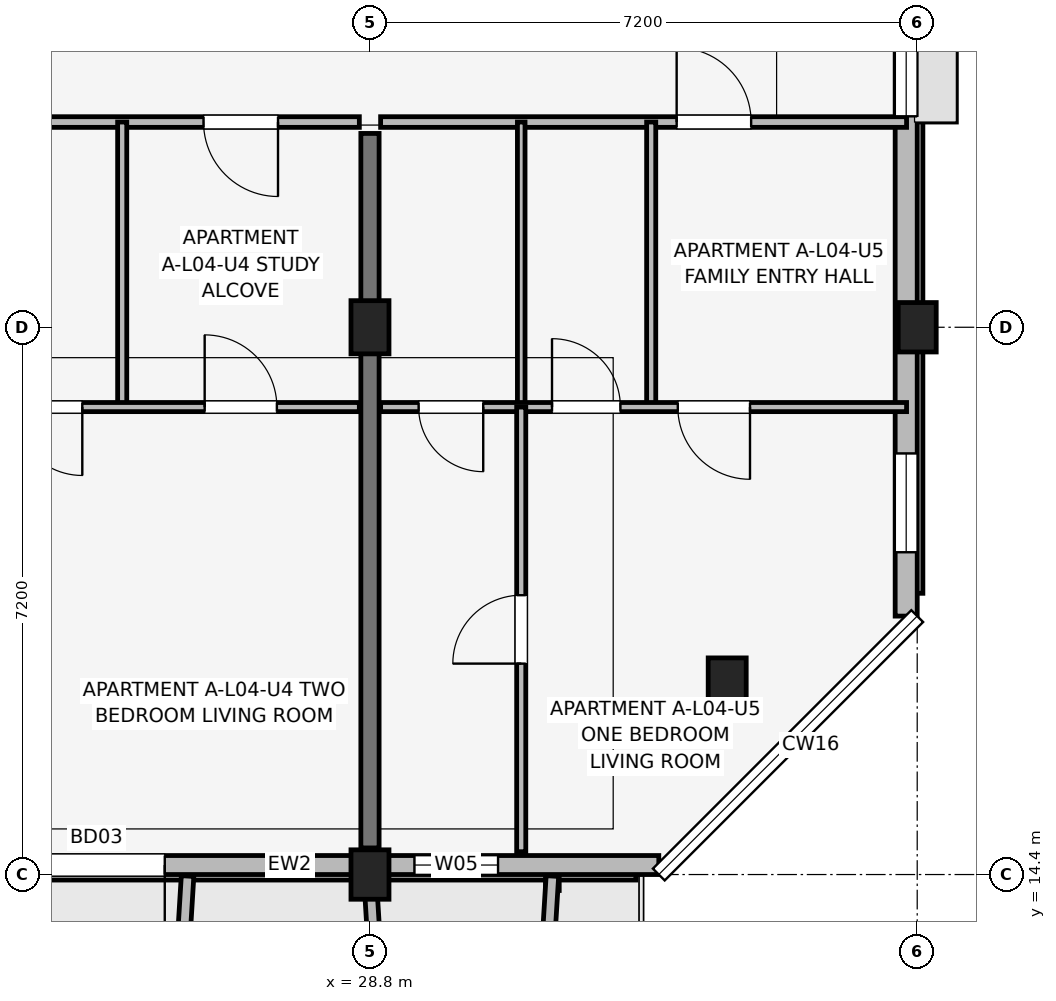
"""IFC4 building model, lengths in metres.
Left out: names, types, materials, properties, quantities, classifications, styles, units other than length and angle.
Written with IfcOpenShell. Run it as: python <this file> out.ifc"""

import sys

from ifc_helpers import new_model, si_unit, direction, frame, frame_2d, origin, origin_2d, place, context, subcontext, project, spatial, rectangle, extrude, element, fill, save


model = new_model("IFC4")
c1 = context("Model", 3, precision=1e-05, world=origin(), true_north=direction((0.0, 1.0)))
c2 = subcontext(c1, "Body", "Model", "MODEL_VIEW")
j1 = project(units=[si_unit("LENGTHUNIT", "METRE"), si_unit("PLANEANGLEUNIT", "RADIAN")], contexts=[c1])
p1 = place(None, origin())
s1 = spatial("IfcSite", under=j1, at=p1, CompositionType="ELEMENT")
p2 = place(p1, origin())
s2 = spatial("IfcBuilding", under=s1, at=p2, CompositionType="ELEMENT")
p3 = place(p2, frame((0.0, 0.0, 15.0)))
s3 = spatial("IfcBuildingStorey", under=s2, at=p3, CompositionType="ELEMENT", Elevation=15.0)
p4 = place(p3, frame((28.8, 14.4, 0.0), z_axis=(0.0, 0.0, 1.0), x_axis=(1.0, 0.0, 0.0)))
e1 = element("IfcColumn", 1, at=p4, inside=s3, PredefinedType="COLUMN", context=c2, shape_type="SweptSolid", body=[
    extrude(rectangle(XDim=0.5, YDim=0.65, at=origin_2d()), origin(), (0.0, 0.0, 1.0), 3.15),
])
for number, where, z_axis, x_axis in (
    (2, (28.8, 21.6, 0.0), (0.0, 0.0, 1.0), (1.0, 0.0, 0.0)),
    (3, (33.5, 16.9, 0.0), (0.0, 0.0, 1.0), (1.0, 0.0, 0.0)),
):
    element("IfcColumn", number, at=place(p3, frame(where, z_axis=z_axis, x_axis=x_axis)), inside=s3, PredefinedType="COLUMN", context=c2, shape_type="SweptSolid", body=[
        extrude(rectangle(XDim=0.5, YDim=0.7, at=origin_2d()), origin(), (0.0, 0.0, 1.0), 3.15),
    ])
p5 = place(p3, frame((36.0, 21.6, 0.0), z_axis=(0.0, 0.0, 1.0), x_axis=(1.0, 0.0, 0.0)))
e4 = element("IfcColumn", 4, at=p5, inside=s3, PredefinedType="COLUMN", context=c2, shape_type="SweptSolid", body=[
    extrude(rectangle(XDim=0.5, YDim=0.65, at=origin_2d()), origin(), (0.0, 0.0, 1.0), 3.15),
])
p6 = place(p3, frame((28.8, 14.75, 0.0), z_axis=(0.0, 0.0, 1.0), x_axis=(0.0, 1.0, 0.0)))
e5 = element("IfcWall", 5, at=p6, inside=s3, PredefinedType="SHEAR", context=c2, shape_type="SweptSolid", body=[
    extrude(rectangle(XDim=9.4, YDim=0.24, at=frame_2d((4.7, 0.0))), origin(), (0.0, 0.0, 1.0), 3.15),
])
p7 = place(p3, frame((3.4, 14.525, 0.0), z_axis=(0.0, 0.0, 1.0), x_axis=(1.0, 0.0, 0.0)))
e6 = element("IfcWall", 6, at=p7, inside=s3, PredefinedType="SOLIDWALL", context=c2, shape_type="SweptSolid", body=[
    extrude(rectangle(XDim=29.2, YDim=0.25, at=frame_2d((14.6, 0.0))), origin(), (0.0, 0.0, 1.0), 2.43),
])
p8 = place(p7, frame((8.15, 0.0, 0.0), z_axis=(0.0, 0.0, 1.0), x_axis=(-1.0, 0.0, 0.0)))
e7 = element("IfcOpeningElement", 7, at=p8, cuts=e6, PredefinedType="OPENING", context=c2, shape_type="SweptSolid", body=[
    extrude(rectangle(XDim=1.5, YDim=2.15, at=frame_2d((0.75, 1.075))), frame((0.0, 0.135, 0.0), z_axis=(0.0, -1.0, 0.0), x_axis=(1.0, 0.0, 0.0)), (0.0, 0.0, 1.0), 0.27),
])
p9 = place(p7, frame((22.7, 0.0, 0.0), z_axis=(0.0, 0.0, 1.0), x_axis=(-1.0, 0.0, 0.0)))
e8 = element("IfcOpeningElement", 8, at=p9, cuts=e6, PredefinedType="OPENING", context=c2, shape_type="SweptSolid", body=[
    extrude(rectangle(XDim=1.8, YDim=2.15, at=frame_2d((0.9, 1.075))), frame((0.0, 0.135, 0.0), z_axis=(0.0, -1.0, 0.0), x_axis=(1.0, 0.0, 0.0)), (0.0, 0.0, 1.0), 0.27),
])
p10 = place(p7, frame((2.155, 0.0, 0.75)))
e9 = element("IfcOpeningElement", 9, at=p10, cuts=e6, PredefinedType="OPENING", context=c2, shape_type="SweptSolid", body=[
    extrude(rectangle(XDim=1.22, YDim=1.5, at=frame_2d((0.61, 0.75))), frame((0.0, 0.135, 0.0), z_axis=(0.0, -1.0, 0.0), x_axis=(1.0, 0.0, 0.0)), (0.0, 0.0, 1.0), 0.27),
])
p11 = place(p7, frame((4.635, 0.0, 0.75)))
e10 = element("IfcOpeningElement", 10, at=p11, cuts=e6, PredefinedType="OPENING", context=c2, shape_type="SweptSolid", body=[
    extrude(rectangle(XDim=0.6, YDim=1.25, at=frame_2d((0.3, 0.625))), frame((0.0, 0.135, 0.0), z_axis=(0.0, -1.0, 0.0), x_axis=(1.0, 0.0, 0.0)), (0.0, 0.0, 1.0), 0.27),
])
p12 = place(p7, frame((11.415, 0.0, 0.7)))
e11 = element("IfcOpeningElement", 11, at=p12, cuts=e6, PredefinedType="OPENING", context=c2, shape_type="SweptSolid", body=[
    extrude(rectangle(XDim=1.86, YDim=1.6, at=frame_2d((0.93, 0.8))), frame((0.0, 0.135, 0.0), z_axis=(0.0, -1.0, 0.0), x_axis=(1.0, 0.0, 0.0)), (0.0, 0.0, 1.0), 0.27),
])
p13 = place(p7, frame((16.43, 0.0, 0.75)))
e12 = element("IfcOpeningElement", 12, at=p13, cuts=e6, PredefinedType="OPENING", context=c2, shape_type="SweptSolid", body=[
    extrude(rectangle(XDim=0.85, YDim=1.4, at=frame_2d((0.425, 0.7))), frame((0.0, 0.135, 0.0), z_axis=(0.0, -1.0, 0.0), x_axis=(1.0, 0.0, 0.0)), (0.0, 0.0, 1.0), 0.27),
])
p14 = place(p7, frame((18.845, 0.0, 0.75)))
e13 = element("IfcOpeningElement", 13, at=p14, cuts=e6, PredefinedType="OPENING", context=c2, shape_type="SweptSolid", body=[
    extrude(rectangle(XDim=0.98, YDim=1.45, at=frame_2d((0.49, 0.725))), frame((0.0, 0.135, 0.0), z_axis=(0.0, -1.0, 0.0), x_axis=(1.0, 0.0, 0.0)), (0.0, 0.0, 1.0), 0.27),
])
p15 = place(p7, frame((25.985, 0.0, 0.75)))
e14 = element("IfcOpeningElement", 14, at=p15, cuts=e6, PredefinedType="OPENING", context=c2, shape_type="SweptSolid", body=[
    extrude(rectangle(XDim=1.1, YDim=1.5, at=frame_2d((0.55, 0.75))), frame((0.0, 0.135, 0.0), z_axis=(0.0, -1.0, 0.0), x_axis=(1.0, 0.0, 0.0)), (0.0, 0.0, 1.0), 0.27),
])
p16 = place(p3, frame((35.855, 17.8, 0.0), z_axis=(0.0, 0.0, 1.0), x_axis=(0.0, 1.0, 0.0)))
e15 = element("IfcWall", 15, at=p16, inside=s3, PredefinedType="SOLIDWALL", context=c2, shape_type="SweptSolid", body=[
    extrude(rectangle(XDim=14.8, YDim=0.29, at=frame_2d((7.4, 0.0))), origin(), (0.0, 0.0, 1.0), 2.38),
])
p17 = place(p16, frame((6.575, 0.0, 1.05)))
e16 = element("IfcOpeningElement", 16, at=p17, cuts=e15, PredefinedType="OPENING", context=c2, shape_type="SweptSolid", body=[
    extrude(rectangle(XDim=1.65, YDim=1.15, at=frame_2d((0.825, 0.575))), frame((0.0, 0.155, 0.0), z_axis=(0.0, -1.0, 0.0), x_axis=(1.0, 0.0, 0.0)), (0.0, 0.0, 1.0), 0.31),
])
p18 = place(p16, frame((0.84, 0.0, 0.72)))
e17 = element("IfcOpeningElement", 17, at=p18, cuts=e15, PredefinedType="OPENING", context=c2, shape_type="SweptSolid", body=[
    extrude(rectangle(XDim=1.3, YDim=1.55, at=frame_2d((0.65, 0.775))), frame((0.0, 0.155, 0.0), z_axis=(0.0, -1.0, 0.0), x_axis=(1.0, 0.0, 0.0)), (0.0, 0.0, 1.0), 0.31),
])
p19 = place(p3, frame((26.4, 14.38, 0.0), z_axis=(0.0, 0.0, 1.0), x_axis=(-0.061046865508, -0.998134900808, 0.0)))
e18 = element("IfcWall", 18, at=p19, inside=s3, PredefinedType="ELEMENTEDWALL", context=c2, shape_type="SweptSolid", body=[
    extrude(rectangle(XDim=1.964, YDim=0.165, at=frame_2d((0.982, 0.0))), origin(), (0.0, 0.0, 1.0), 2.48),
])
for number, where, z_axis, x_axis in (
    (19, (28.8, 14.38, 0.0), (0.0, 0.0, 1.0), (0.061, -0.998, 0.0)),
    (20, (31.2, 14.38, 0.0), (0.0, 0.0, 1.0), (-0.061, -0.998, 0.0)),
):
    element("IfcWall", number, at=place(p3, frame(where, z_axis=z_axis, x_axis=x_axis)), inside=s3, PredefinedType="ELEMENTEDWALL", context=c2, shape_type="SweptSolid", body=[
        extrude(rectangle(XDim=1.964, YDim=0.165, at=frame_2d((0.982, 0.0))), origin(), (0.0, 0.0, 1.0), 2.95),
    ])
p20 = place(p3, frame((21.74, 24.3, 0.0), z_axis=(0.0, 0.0, 1.0), x_axis=(1.0, 0.0, 0.0)))
e21 = element("IfcWall", 21, at=p20, inside=s3, PredefinedType="PARTITIONING", context=c2, shape_type="SweptSolid", body=[
    extrude(rectangle(XDim=6.92, YDim=0.14, at=frame_2d((3.46, 0.0))), origin(), (0.0, 0.0, 1.0), 2.38),
])
p21 = place(p20, frame((5.85, 0.0, 0.0), z_axis=(0.0, 0.0, 1.0), x_axis=(-1.0, 0.0, 0.0)))
e22 = element("IfcOpeningElement", 22, at=p21, cuts=e21, PredefinedType="OPENING", context=c2, shape_type="SweptSolid", body=[
    extrude(rectangle(XDim=0.98, YDim=2.1, at=frame_2d((0.49, 1.05))), frame((0.0, 0.08, 0.0), z_axis=(0.0, -1.0, 0.0), x_axis=(1.0, 0.0, 0.0)), (0.0, 0.0, 1.0), 0.16),
])
p22 = place(p3, frame((25.54, 20.55, 0.0), z_axis=(0.0, 0.0, 1.0), x_axis=(0.0, 1.0, 0.0)))
e23 = element("IfcWall", 23, at=p22, inside=s3, PredefinedType="PARTITIONING", context=c2, shape_type="SweptSolid", body=[
    extrude(rectangle(XDim=3.75, YDim=0.12, at=frame_2d((1.875, 0.0))), origin(), (0.0, 0.0, 1.0), 2.375),
])
p23 = place(p3, frame((21.74, 20.55, 0.0), z_axis=(0.0, 0.0, 1.0), x_axis=(1.0, 0.0, 0.0)))
e24 = element("IfcWall", 24, at=p23, inside=s3, PredefinedType="PARTITIONING", context=c2, shape_type="SweptSolid", body=[
    extrude(rectangle(XDim=6.92, YDim=0.12, at=frame_2d((3.46, 0.0))), origin(), (0.0, 0.0, 1.0), 2.38),
])
p24 = place(p23, frame((0.5, 0.0, 0.0)))
e25 = element("IfcOpeningElement", 25, at=p24, cuts=e24, PredefinedType="OPENING", context=c2, shape_type="SweptSolid", body=[
    extrude(rectangle(XDim=0.85, YDim=2.08, at=frame_2d((0.425, 1.04))), frame((0.0, 0.07, 0.0), z_axis=(0.0, -1.0, 0.0), x_axis=(1.0, 0.0, 0.0)), (0.0, 0.0, 1.0), 0.14),
])
p25 = place(p23, frame((3.275, 0.0, 0.0), z_axis=(0.0, 0.0, 1.0), x_axis=(-1.0, 0.0, 0.0)))
e26 = element("IfcOpeningElement", 26, at=p25, cuts=e24, PredefinedType="OPENING", context=c2, shape_type="SweptSolid", body=[
    extrude(rectangle(XDim=0.9, YDim=2.08, at=frame_2d((0.45, 1.04))), frame((0.0, 0.07, 0.0), z_axis=(0.0, -1.0, 0.0), x_axis=(1.0, 0.0, 0.0)), (0.0, 0.0, 1.0), 0.14),
])
p26 = place(p23, frame((4.885, 0.0, 0.0)))
e27 = element("IfcOpeningElement", 27, at=p26, cuts=e24, PredefinedType="OPENING", context=c2, shape_type="SweptSolid", body=[
    extrude(rectangle(XDim=0.95, YDim=2.08, at=frame_2d((0.475, 1.04))), frame((0.0, 0.07, 0.0), z_axis=(0.0, -1.0, 0.0), x_axis=(1.0, 0.0, 0.0)), (0.0, 0.0, 1.0), 0.14),
])
p27 = place(p3, frame((28.94, 24.3, 0.0), z_axis=(0.0, 0.0, 1.0), x_axis=(1.0, 0.0, 0.0)))
e28 = element("IfcWall", 28, at=p27, inside=s3, PredefinedType="PARTITIONING", context=c2, shape_type="SweptSolid", body=[
    extrude(rectangle(XDim=6.92, YDim=0.14, at=frame_2d((3.46, 0.0))), origin(), (0.0, 0.0, 1.0), 2.38),
])
p28 = place(p27, frame((3.895, 0.0, 0.0)))
e29 = element("IfcOpeningElement", 29, at=p28, cuts=e28, PredefinedType="OPENING", context=c2, shape_type="SweptSolid", body=[
    extrude(rectangle(XDim=0.98, YDim=2.1, at=frame_2d((0.49, 1.05))), frame((0.0, 0.08, 0.0), z_axis=(0.0, -1.0, 0.0), x_axis=(1.0, 0.0, 0.0)), (0.0, 0.0, 1.0), 0.16),
])
p29 = place(p3, frame((30.79, 20.55, 0.0), z_axis=(0.0, 0.0, 1.0), x_axis=(0.0, 1.0, 0.0)))
e30 = element("IfcWall", 30, at=p29, inside=s3, PredefinedType="PARTITIONING", context=c2, shape_type="SweptSolid", body=[
    extrude(rectangle(XDim=3.75, YDim=0.1, at=frame_2d((1.875, 0.0))), origin(), (0.0, 0.0, 1.0), 2.375),
])
p30 = place(p3, frame((32.5, 20.55, 0.0), z_axis=(0.0, 0.0, 1.0), x_axis=(0.0, 1.0, 0.0)))
e31 = element("IfcWall", 31, at=p30, inside=s3, PredefinedType="PARTITIONING", context=c2, shape_type="SweptSolid", body=[
    extrude(rectangle(XDim=3.75, YDim=0.12, at=frame_2d((1.875, 0.0))), origin(), (0.0, 0.0, 1.0), 2.375),
])
p31 = place(p3, frame((28.94, 20.55, 0.0), z_axis=(0.0, 0.0, 1.0), x_axis=(1.0, 0.0, 0.0)))
e32 = element("IfcWall", 32, at=p31, inside=s3, PredefinedType="PARTITIONING", context=c2, shape_type="SweptSolid", body=[
    extrude(rectangle(XDim=6.92, YDim=0.12, at=frame_2d((3.46, 0.0))), origin(), (0.0, 0.0, 1.0), 2.38),
])
p32 = place(p31, frame((1.35, 0.0, 0.0), z_axis=(0.0, 0.0, 1.0), x_axis=(-1.0, 0.0, 0.0)))
e33 = element("IfcOpeningElement", 33, at=p32, cuts=e32, PredefinedType="OPENING", context=c2, shape_type="SweptSolid", body=[
    extrude(rectangle(XDim=0.85, YDim=2.08, at=frame_2d((0.425, 1.04))), frame((0.0, 0.07, 0.0), z_axis=(0.0, -1.0, 0.0), x_axis=(1.0, 0.0, 0.0)), (0.0, 0.0, 1.0), 0.14),
])
p33 = place(p31, frame((2.255, 0.0, 0.0)))
e34 = element("IfcOpeningElement", 34, at=p33, cuts=e32, PredefinedType="OPENING", context=c2, shape_type="SweptSolid", body=[
    extrude(rectangle(XDim=0.9, YDim=2.08, at=frame_2d((0.45, 1.04))), frame((0.0, 0.07, 0.0), z_axis=(0.0, -1.0, 0.0), x_axis=(1.0, 0.0, 0.0)), (0.0, 0.0, 1.0), 0.14),
])
p34 = place(p31, frame((4.86, 0.0, 0.0), z_axis=(0.0, 0.0, 1.0), x_axis=(-1.0, 0.0, 0.0)))
e35 = element("IfcOpeningElement", 35, at=p34, cuts=e32, PredefinedType="OPENING", context=c2, shape_type="SweptSolid", body=[
    extrude(rectangle(XDim=0.95, YDim=2.08, at=frame_2d((0.475, 1.04))), frame((0.0, 0.07, 0.0), z_axis=(0.0, -1.0, 0.0), x_axis=(1.0, 0.0, 0.0)), (0.0, 0.0, 1.0), 0.14),
])
p35 = place(p3, frame((30.79, 14.7, 0.0), z_axis=(0.0, 0.0, 1.0), x_axis=(0.0, 1.0, 0.0)))
e36 = element("IfcWall", 36, at=p35, inside=s3, PredefinedType="PARTITIONING", context=c2, shape_type="SweptSolid", body=[
    extrude(rectangle(XDim=5.85, YDim=0.12, at=frame_2d((2.925, 0.0))), origin(), (0.0, 0.0, 1.0), 2.38),
])
p36 = place(p35, frame((2.475, 0.0, 0.0)))
e37 = element("IfcOpeningElement", 37, at=p36, cuts=e36, PredefinedType="OPENING", context=c2, shape_type="SweptSolid", body=[
    extrude(rectangle(XDim=0.9, YDim=2.08, at=frame_2d((0.45, 1.04))), frame((0.0, 0.07, 0.0), z_axis=(0.0, -1.0, 0.0), x_axis=(1.0, 0.0, 0.0)), (0.0, 0.0, 1.0), 0.14),
])
p37 = place(p9, origin())
e38 = element("IfcDoor", 38, at=p37, inside=s3, OperationType="SINGLE_SWING_RIGHT", PredefinedType="DOOR", context=c2, shape_type="SweptSolid", body=[
    extrude(rectangle(XDim=1.8, YDim=2.15, at=frame_2d((0.9, 1.075))), frame((0.0, 0.025, 0.0), z_axis=(0.0, -1.0, 0.0), x_axis=(1.0, 0.0, 0.0)), (0.0, 0.0, 1.0), 0.05),
])
fill(e8, e38)
p38 = place(p15, origin())
e39 = element("IfcWindow", 39, at=p38, inside=s3, PartitioningType="SINGLE_PANEL", PredefinedType="WINDOW", context=c2, shape_type="SweptSolid", body=[
    extrude(rectangle(XDim=1.1, YDim=1.5, at=frame_2d((0.55, 0.75))), frame((0.0, 0.03, 0.0), z_axis=(0.0, -1.0, 0.0), x_axis=(1.0, 0.0, 0.0)), (0.0, 0.0, 1.0), 0.06),
])
fill(e14, e39)
p39 = place(p17, origin())
e40 = element("IfcWindow", 40, at=p39, inside=s3, PartitioningType="SINGLE_PANEL", PredefinedType="WINDOW", context=c2, shape_type="SweptSolid", body=[
    extrude(rectangle(XDim=1.65, YDim=1.15, at=frame_2d((0.825, 0.575))), frame((0.0, 0.03, 0.0), z_axis=(0.0, -1.0, 0.0), x_axis=(1.0, 0.0, 0.0)), (0.0, 0.0, 1.0), 0.06),
])
fill(e16, e40)
p40 = place(p18, origin())
e41 = element("IfcWindow", 41, at=p40, inside=s3, PartitioningType="SINGLE_PANEL", PredefinedType="WINDOW", context=c2, shape_type="SweptSolid", body=[
    extrude(rectangle(XDim=1.3, YDim=1.55, at=frame_2d((0.65, 0.775))), frame((0.0, 0.03, 0.0), z_axis=(0.0, -1.0, 0.0), x_axis=(1.0, 0.0, 0.0)), (0.0, 0.0, 1.0), 0.06),
])
fill(e17, e41)
p41 = place(p21, origin())
e42 = element("IfcDoor", 42, at=p41, inside=s3, OperationType="SINGLE_SWING_RIGHT", PredefinedType="DOOR", context=c2, shape_type="SweptSolid", body=[
    extrude(rectangle(XDim=0.98, YDim=2.1, at=frame_2d((0.49, 1.05))), frame((0.0, 0.025, 0.0), z_axis=(0.0, -1.0, 0.0), x_axis=(1.0, 0.0, 0.0)), (0.0, 0.0, 1.0), 0.05),
])
fill(e22, e42)
p42 = place(p25, origin())
e43 = element("IfcDoor", 43, at=p42, inside=s3, OperationType="SINGLE_SWING_RIGHT", PredefinedType="DOOR", context=c2, shape_type="SweptSolid", body=[
    extrude(rectangle(XDim=0.9, YDim=2.08, at=frame_2d((0.45, 1.04))), frame((0.0, 0.025, 0.0), z_axis=(0.0, -1.0, 0.0), x_axis=(1.0, 0.0, 0.0)), (0.0, 0.0, 1.0), 0.05),
])
fill(e26, e43)
p43 = place(p26, origin())
e44 = element("IfcDoor", 44, at=p43, inside=s3, OperationType="SINGLE_SWING_LEFT", PredefinedType="DOOR", context=c2, shape_type="SweptSolid", body=[
    extrude(rectangle(XDim=0.95, YDim=2.08, at=frame_2d((0.475, 1.04))), frame((0.0, 0.025, 0.0), z_axis=(0.0, -1.0, 0.0), x_axis=(1.0, 0.0, 0.0)), (0.0, 0.0, 1.0), 0.05),
])
fill(e27, e44)
p44 = place(p28, origin())
e45 = element("IfcDoor", 45, at=p44, inside=s3, OperationType="SINGLE_SWING_LEFT", PredefinedType="DOOR", context=c2, shape_type="SweptSolid", body=[
    extrude(rectangle(XDim=0.98, YDim=2.1, at=frame_2d((0.49, 1.05))), frame((0.0, 0.025, 0.0), z_axis=(0.0, -1.0, 0.0), x_axis=(1.0, 0.0, 0.0)), (0.0, 0.0, 1.0), 0.05),
])
fill(e29, e45)
p45 = place(p32, origin())
e46 = element("IfcDoor", 46, at=p45, inside=s3, OperationType="SINGLE_SWING_RIGHT", PredefinedType="DOOR", context=c2, shape_type="SweptSolid", body=[
    extrude(rectangle(XDim=0.85, YDim=2.08, at=frame_2d((0.425, 1.04))), frame((0.0, 0.025, 0.0), z_axis=(0.0, -1.0, 0.0), x_axis=(1.0, 0.0, 0.0)), (0.0, 0.0, 1.0), 0.05),
])
fill(e33, e46)
p46 = place(p33, origin())
e47 = element("IfcDoor", 47, at=p46, inside=s3, OperationType="SINGLE_SWING_LEFT", PredefinedType="DOOR", context=c2, shape_type="SweptSolid", body=[
    extrude(rectangle(XDim=0.9, YDim=2.08, at=frame_2d((0.45, 1.04))), frame((0.0, 0.025, 0.0), z_axis=(0.0, -1.0, 0.0), x_axis=(1.0, 0.0, 0.0)), (0.0, 0.0, 1.0), 0.05),
])
fill(e34, e47)
p47 = place(p34, origin())
e48 = element("IfcDoor", 48, at=p47, inside=s3, OperationType="SINGLE_SWING_RIGHT", PredefinedType="DOOR", context=c2, shape_type="SweptSolid", body=[
    extrude(rectangle(XDim=0.95, YDim=2.08, at=frame_2d((0.475, 1.04))), frame((0.0, 0.025, 0.0), z_axis=(0.0, -1.0, 0.0), x_axis=(1.0, 0.0, 0.0)), (0.0, 0.0, 1.0), 0.05),
])
fill(e35, e48)
p48 = place(p36, origin())
e49 = element("IfcDoor", 49, at=p48, inside=s3, OperationType="SINGLE_SWING_LEFT", PredefinedType="DOOR", context=c2, shape_type="SweptSolid", body=[
    extrude(rectangle(XDim=0.9, YDim=2.08, at=frame_2d((0.45, 1.04))), frame((0.0, 0.025, 0.0), z_axis=(0.0, -1.0, 0.0), x_axis=(1.0, 0.0, 0.0)), (0.0, 0.0, 1.0), 0.05),
])
fill(e37, e49)
save(model, sys.argv[1])
